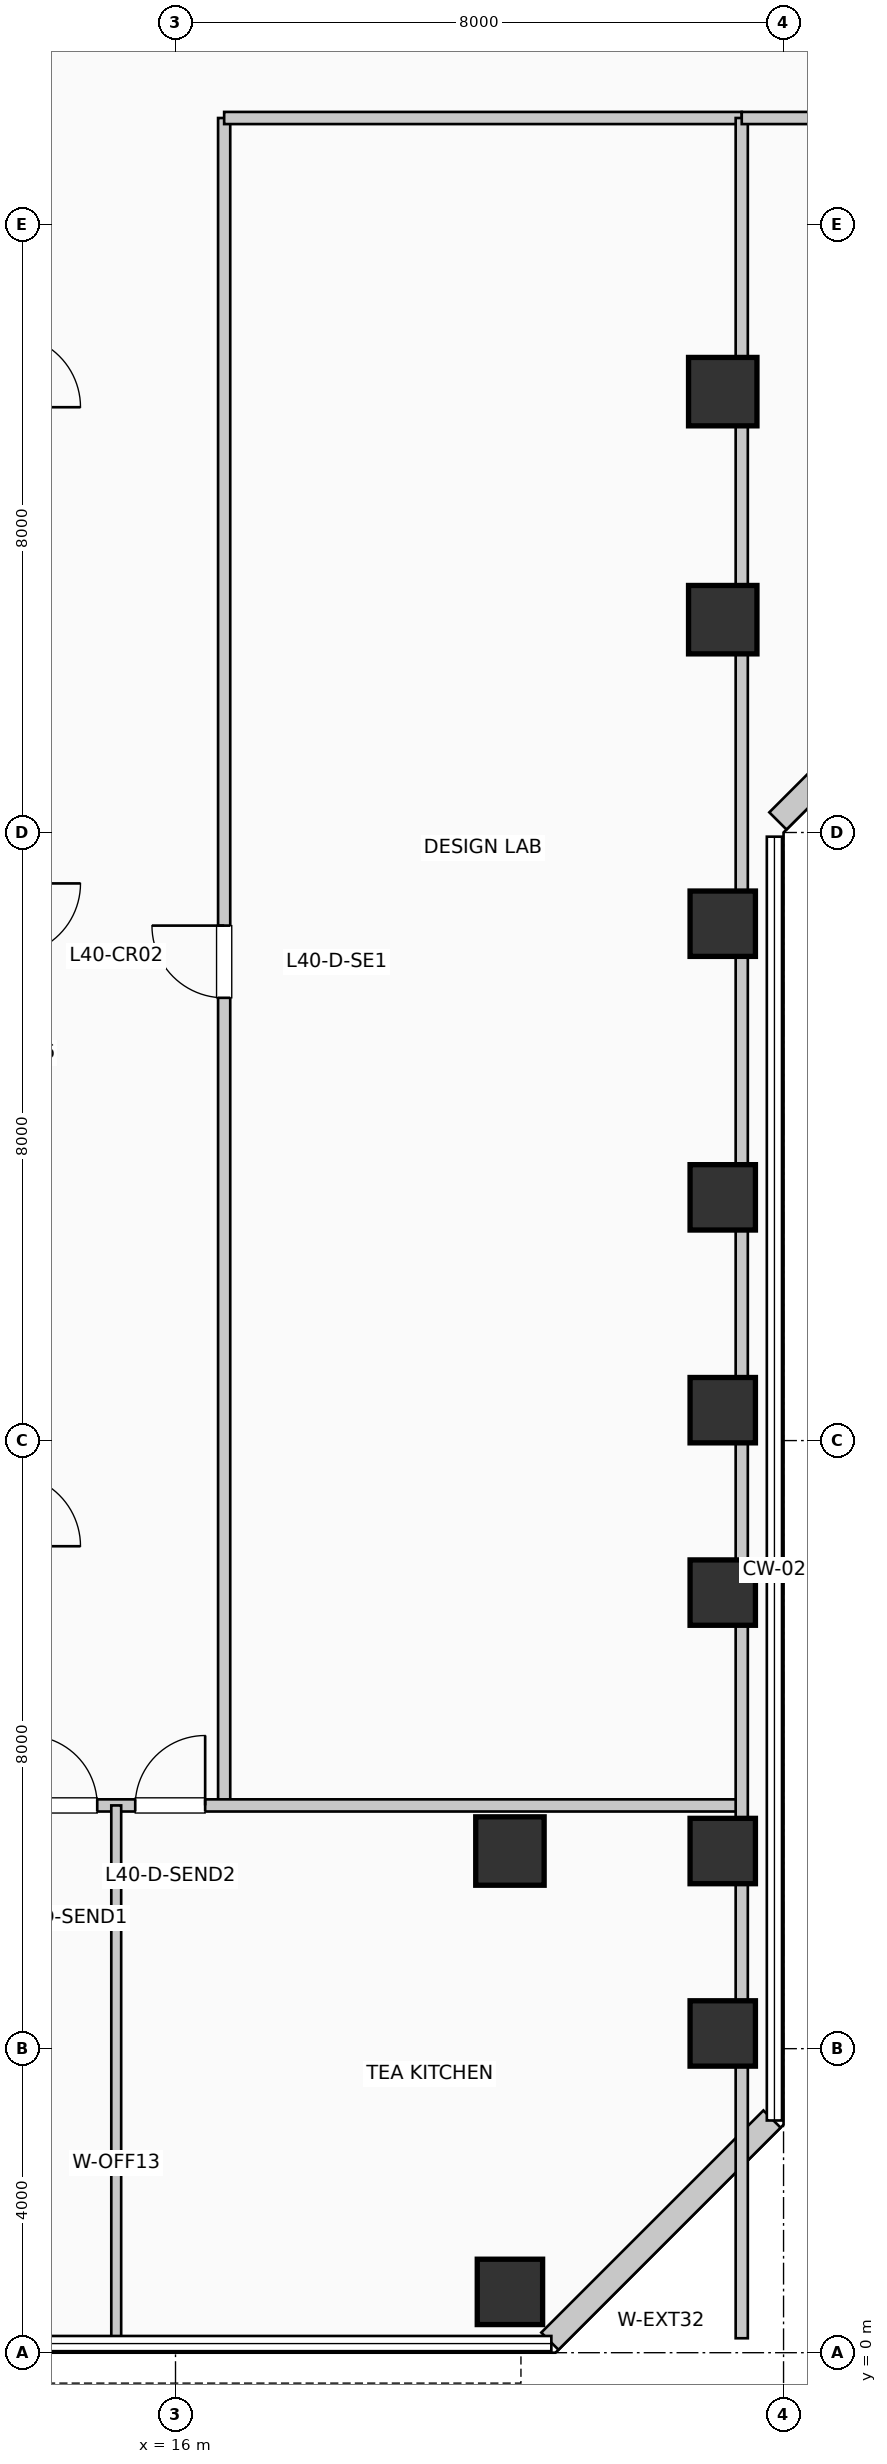
"""IFC4 building model, lengths in metres.
Left out: names, types, materials, properties, quantities, classifications, styles, units other than length and angle.
Written with IfcOpenShell. Run it as: python <this file> out.ifc"""

import sys

from ifc_helpers import new_model, si_unit, direction, frame, frame_2d, origin, origin_2d, place, context, subcontext, project, spatial, rectangle, extrude, element, fill, save


model = new_model("IFC4")
c1 = context("Model", 3, precision=1e-05, world=origin(), true_north=direction((0.0, 1.0)))
c2 = subcontext(c1, "Body", "Model", "MODEL_VIEW")
j1 = project(units=[si_unit("LENGTHUNIT", "METRE"), si_unit("PLANEANGLEUNIT", "RADIAN")], contexts=[c1])
p1 = place(None, origin())
s1 = spatial("IfcSite", under=j1, at=p1, CompositionType="ELEMENT")
p2 = place(p1, origin())
s2 = spatial("IfcBuilding", under=s1, at=p2, CompositionType="ELEMENT")
p3 = place(p2, frame((0.0, 0.0, 166.65)))
s3 = spatial("IfcBuildingStorey", under=s2, at=p3, CompositionType="ELEMENT", Elevation=166.65)
p4 = place(p3, frame((20.4, 0.8, 0.0), z_axis=(0.0, 0.0, 1.0), x_axis=(1.0, 0.0, 0.0)))
e1 = element("IfcColumn", 1, at=p4, inside=s3, PredefinedType="COLUMN", context=c2, shape_type="SweptSolid", body=[
    extrude(rectangle(XDim=0.86, YDim=0.86, at=origin_2d()), origin(), (0.0, 0.0, 1.0), 3.96),
])
p5 = place(p3, frame((20.4, 6.6, 0.0), z_axis=(0.0, 0.0, 1.0), x_axis=(1.0, 0.0, 0.0)))
e2 = element("IfcColumn", 2, at=p5, inside=s3, PredefinedType="COLUMN", context=c2, shape_type="SweptSolid", body=[
    extrude(rectangle(XDim=0.9, YDim=0.9, at=origin_2d()), origin(), (0.0, 0.0, 1.0), 3.96),
])
for number, where, z_axis, x_axis in (
    (3, (23.2, 4.2, 0.0), (0.0, 0.0, 1.0), (1.0, 0.0, 0.0)),
    (4, (23.2, 6.6, 0.0), (0.0, 0.0, 1.0), (1.0, 0.0, 0.0)),
    (5, (23.2, 10.0, 0.0), (0.0, 0.0, 1.0), (1.0, 0.0, 0.0)),
    (6, (23.2, 12.4, 0.0), (0.0, 0.0, 1.0), (1.0, 0.0, 0.0)),
    (7, (23.2, 15.2, 0.0), (0.0, 0.0, 1.0), (1.0, 0.0, 0.0)),
    (8, (23.2, 18.8, 0.0), (0.0, 0.0, 1.0), (1.0, 0.0, 0.0)),
):
    element("IfcColumn", number, at=place(p3, frame(where, z_axis=z_axis, x_axis=x_axis)), inside=s3, PredefinedType="COLUMN", context=c2, shape_type="SweptSolid", body=[
        extrude(rectangle(XDim=0.86, YDim=0.86, at=origin_2d()), origin(), (0.0, 0.0, 1.0), 3.96),
    ])
for number, where, z_axis, x_axis in (
    (9, (23.2, 22.8, 0.0), (0.0, 0.0, 1.0), (1.0, 0.0, 0.0)),
    (10, (23.2, 25.8, 0.0), (0.0, 0.0, 1.0), (1.0, 0.0, 0.0)),
):
    element("IfcColumn", number, at=place(p3, frame(where, z_axis=z_axis, x_axis=x_axis)), inside=s3, PredefinedType="COLUMN", context=c2, shape_type="SweptSolid", body=[
        extrude(rectangle(XDim=0.9, YDim=0.9, at=origin_2d()), origin(), (0.0, 0.0, 1.0), 3.96),
    ])
p6 = place(p3, frame((20.926, 0.152, 0.0), z_axis=(0.0, 0.0, 1.0), x_axis=(0.707106781187, 0.707106781187, 0.0)))
e11 = element("IfcWall", 11, at=p6, inside=s3, PredefinedType="SOLIDWALL", context=c2, shape_type="SweptSolid", body=[
    extrude(rectangle(XDim=4.133, YDim=0.32, at=frame_2d((2.066, 0.0))), origin(), (0.0, 0.0, 1.0), 3.71),
])
p7 = place(p3, frame((23.926, 20.152, 0.0), z_axis=(0.0, 0.0, 1.0), x_axis=(0.707106781187, 0.707106781187, 0.0)))
e12 = element("IfcWall", 12, at=p7, inside=s3, PredefinedType="SOLIDWALL", context=c2, shape_type="SweptSolid", body=[
    extrude(rectangle(XDim=2.718, YDim=0.32, at=frame_2d((1.359, 0.0))), origin(), (0.0, 0.0, 1.0), 3.71),
])
p8 = place(p3, frame((16.64, 7.2, 0.0), z_axis=(0.0, 0.0, 1.0), x_axis=(0.0, 1.0, 0.0)))
e13 = element("IfcWall", 13, at=p8, inside=s3, PredefinedType="PARTITIONING", context=c2, shape_type="SweptSolid", body=[
    extrude(rectangle(XDim=22.2, YDim=0.16, at=frame_2d((11.1, 0.0))), origin(), (0.0, 0.0, 1.0), 3.71),
])
p9 = place(p8, frame((10.625, 0.0, 0.0)))
e14 = element("IfcOpeningElement", 14, at=p9, cuts=e13, PredefinedType="OPENING", context=c2, shape_type="SweptSolid", body=[
    extrude(rectangle(XDim=0.95, YDim=2.15, at=frame_2d((0.475, 1.075))), frame((0.0, 0.09, 0.0), z_axis=(0.0, -1.0, 0.0), x_axis=(1.0, 0.0, 0.0)), (0.0, 0.0, 1.0), 0.18),
])
p10 = place(p3, frame((0.19, 7.2, 0.0), z_axis=(0.0, 0.0, 1.0), x_axis=(1.0, 0.0, 0.0)))
e15 = element("IfcWall", 15, at=p10, inside=s3, PredefinedType="PARTITIONING", context=c2, shape_type="SweptSolid", body=[
    extrude(rectangle(XDim=23.26, YDim=0.16, at=frame_2d((11.63, 0.0))), origin(), (0.0, 0.0, 1.0), 3.71),
])
p11 = place(p10, frame((13.86, 0.0, 0.0)))
e16 = element("IfcOpeningElement", 16, at=p11, cuts=e15, PredefinedType="OPENING", context=c2, shape_type="SweptSolid", body=[
    extrude(rectangle(XDim=0.92, YDim=2.1, at=frame_2d((0.46, 1.05))), frame((0.0, 0.09, 0.0), z_axis=(0.0, -1.0, 0.0), x_axis=(1.0, 0.0, 0.0)), (0.0, 0.0, 1.0), 0.18),
])
p12 = place(p10, frame((15.28, 0.0, 0.0)))
e17 = element("IfcOpeningElement", 17, at=p12, cuts=e15, PredefinedType="OPENING", context=c2, shape_type="SweptSolid", body=[
    extrude(rectangle(XDim=0.92, YDim=2.1, at=frame_2d((0.46, 1.05))), frame((0.0, 0.09, 0.0), z_axis=(0.0, -1.0, 0.0), x_axis=(1.0, 0.0, 0.0)), (0.0, 0.0, 1.0), 0.18),
])
p13 = place(p3, frame((16.64, 29.4, 0.0), z_axis=(0.0, 0.0, 1.0), x_axis=(1.0, 0.0, 0.0)))
e18 = element("IfcWall", 18, at=p13, inside=s3, PredefinedType="PARTITIONING", context=c2, shape_type="SweptSolid", body=[
    extrude(rectangle(XDim=6.81, YDim=0.16, at=frame_2d((3.405, 0.0))), origin(), (0.0, 0.0, 1.0), 3.71),
])
p14 = place(p3, frame((23.45, 0.19, 0.0), z_axis=(0.0, 0.0, 1.0), x_axis=(0.0, 1.0, 0.0)))
e19 = element("IfcWall", 19, at=p14, inside=s3, PredefinedType="PARTITIONING", context=c2, shape_type="SweptSolid", body=[
    extrude(rectangle(XDim=29.21, YDim=0.16, at=frame_2d((14.605, 0.0))), origin(), (0.0, 0.0, 1.0), 3.045),
])
p15 = place(p3, frame((15.22, 0.19, 0.0), z_axis=(0.0, 0.0, 1.0), x_axis=(0.0, 1.0, 0.0)))
e20 = element("IfcWall", 20, at=p15, inside=s3, PredefinedType="PARTITIONING", context=c2, shape_type="SweptSolid", body=[
    extrude(rectangle(XDim=7.01, YDim=0.13, at=frame_2d((3.505, 0.0))), origin(), (0.0, 0.0, 1.0), 3.71),
])
p16 = place(p3, frame((23.45, 29.4, 0.0), z_axis=(0.0, 0.0, 1.0), x_axis=(1.0, 0.0, 0.0)))
e21 = element("IfcWall", 21, at=p16, inside=s3, PredefinedType="PARTITIONING", context=c2, shape_type="SweptSolid", body=[
    extrude(rectangle(XDim=26.56, YDim=0.16, at=frame_2d((13.28, 0.0))), origin(), (0.0, 0.0, 1.0), 3.365),
])
p17 = place(p16, frame((13.755, 0.0, 0.0), z_axis=(0.0, 0.0, 1.0), x_axis=(-1.0, 0.0, 0.0)))
e22 = element("IfcOpeningElement", 22, at=p17, cuts=e21, PredefinedType="OPENING", context=c2, shape_type="SweptSolid", body=[
    extrude(rectangle(XDim=0.95, YDim=2.15, at=frame_2d((0.475, 1.075))), frame((0.0, 0.09, 0.0), z_axis=(0.0, -1.0, 0.0), x_axis=(1.0, 0.0, 0.0)), (0.0, 0.0, 1.0), 0.18),
])
p18 = place(p11, origin())
e23 = element("IfcDoor", 23, at=p18, inside=s3, OperationType="SINGLE_SWING_LEFT", PredefinedType="DOOR", context=c2, shape_type="SweptSolid", body=[
    extrude(rectangle(XDim=0.92, YDim=2.1, at=frame_2d((0.46, 1.05))), frame((0.0, 0.025, 0.0), z_axis=(0.0, -1.0, 0.0), x_axis=(1.0, 0.0, 0.0)), (0.0, 0.0, 1.0), 0.05),
])
fill(e16, e23)
p19 = place(p12, origin())
e24 = element("IfcDoor", 24, at=p19, inside=s3, OperationType="SINGLE_SWING_RIGHT", PredefinedType="DOOR", context=c2, shape_type="SweptSolid", body=[
    extrude(rectangle(XDim=0.92, YDim=2.1, at=frame_2d((0.46, 1.05))), frame((0.0, 0.025, 0.0), z_axis=(0.0, -1.0, 0.0), x_axis=(1.0, 0.0, 0.0)), (0.0, 0.0, 1.0), 0.05),
])
fill(e17, e24)
p20 = place(p9, origin())
e25 = element("IfcDoor", 25, at=p20, inside=s3, OperationType="SINGLE_SWING_RIGHT", PredefinedType="DOOR", context=c2, shape_type="SweptSolid", body=[
    extrude(rectangle(XDim=0.95, YDim=2.15, at=frame_2d((0.475, 1.075))), frame((0.0, 0.025, 0.0), z_axis=(0.0, -1.0, 0.0), x_axis=(1.0, 0.0, 0.0)), (0.0, 0.0, 1.0), 0.05),
])
fill(e14, e25)
save(model, sys.argv[1])
